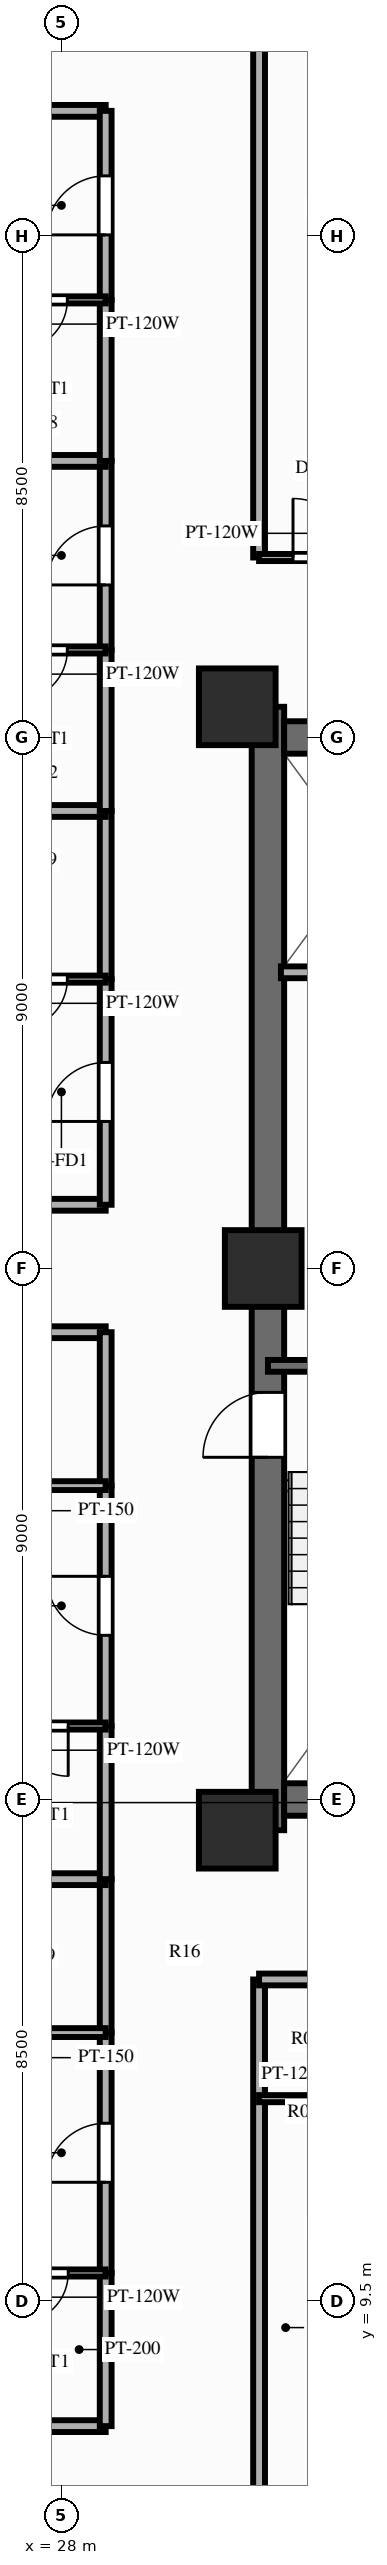
"""IFC4 building model, lengths in metres.
Left out: names, types, materials, properties, quantities, classifications, styles, units other than length and angle.
Written with IfcOpenShell. Run it as: python <this file> out.ifc"""

import sys

from ifc_helpers import new_model, si_unit, direction, frame, frame_2d, origin, origin_2d, place, context, subcontext, project, spatial, rectangle, extrude, source, transform, mapped, element, fill, save


model = new_model("IFC4")
c1 = context("Model", 3, precision=1e-05, world=origin(), true_north=direction((0.0, 1.0)))
c2 = subcontext(c1, "Body", "Model", "MODEL_VIEW")
j1 = project(units=[si_unit("LENGTHUNIT", "METRE"), si_unit("PLANEANGLEUNIT", "RADIAN")], contexts=[c1])
p1 = place(None, origin())
s1 = spatial("IfcSite", under=j1, at=p1, CompositionType="ELEMENT")
p2 = place(p1, origin())
s2 = spatial("IfcBuilding", under=s1, at=p2, CompositionType="ELEMENT")
p3 = place(p2, frame((0.0, 0.0, 116.85)))
s3 = spatial("IfcBuildingStorey", under=s2, at=p3, CompositionType="ELEMENT", Elevation=116.85)
p4 = place(p3, frame((31.5, 17.48, 0.0), z_axis=(0.0, 0.0, 1.0), x_axis=(0.0, 1.0, 0.0)))
e1 = element("IfcWall", 1, at=p4, inside=s3, PredefinedType="SHEAR", context=c2, shape_type="SweptSolid", body=[
    extrude(rectangle(XDim=19.04, YDim=0.55, at=frame_2d((9.52, 0.0))), origin(), (0.0, 0.0, 1.0), 3.0),
])
p5 = place(p4, frame((6.32, 0.0, 0.0)))
e2 = element("IfcOpeningElement", 2, at=p5, cuts=e1, PredefinedType="OPENING", context=c2, shape_type="SweptSolid", body=[
    extrude(rectangle(XDim=1.1, YDim=2.15, at=frame_2d((0.55, 1.075))), frame((0.0, 0.287, 0.0), z_axis=(0.0, -1.0, 0.0), x_axis=(1.0, 0.0, 0.0)), (0.0, 0.0, 1.0), 0.574),
])
p6 = place(p3, frame((31.775, 18.0, 0.0), z_axis=(0.0, 0.0, 1.0), x_axis=(1.0, 0.0, 0.0)))
e3 = element("IfcWall", 3, at=p6, inside=s3, PredefinedType="SHEAR", context=c2, shape_type="SweptSolid", body=[
    extrude(rectangle(XDim=12.45, YDim=0.55, at=frame_2d((6.225, 0.0))), origin(), (0.0, 0.0, 1.0), 3.0),
])
p7 = place(p3, frame((31.775, 36.0, 0.0), z_axis=(0.0, 0.0, 1.0), x_axis=(1.0, 0.0, 0.0)))
e4 = element("IfcWall", 4, at=p7, inside=s3, PredefinedType="SHEAR", context=c2, shape_type="SweptSolid", body=[
    extrude(rectangle(XDim=12.45, YDim=0.55, at=frame_2d((6.225, 0.0))), origin(), (0.0, 0.0, 1.0), 3.0),
])
p8 = place(p7, frame((5.175, 0.0, 0.0), z_axis=(0.0, 0.0, 1.0), x_axis=(-1.0, 0.0, 0.0)))
e5 = element("IfcOpeningElement", 5, at=p8, cuts=e4, PredefinedType="OPENING", context=c2, shape_type="SweptSolid", body=[
    extrude(rectangle(XDim=1.4, YDim=2.15, at=frame_2d((0.7, 1.075))), frame((0.0, 0.287, 0.0), z_axis=(0.0, -1.0, 0.0), x_axis=(1.0, 0.0, 0.0)), (0.0, 0.0, 1.0), 0.574),
])
m1 = source(origin(), c2, "Body", "SweptSolid", [
    extrude(rectangle(XDim=1.3, YDim=1.3, at=origin_2d()), origin(), (0.0, 0.0, 1.0), 3.0),
])
for number, where, z_axis, x_axis in (
    (6, (30.98, 17.48, 0.0), (0.0, 0.0, 1.0), (1.0, 0.0, 0.0)),
    (7, (30.98, 36.52, 0.0), (0.0, 0.0, 1.0), (1.0, 0.0, 0.0)),
    (8, (31.42, 27.0, 0.0), (0.0, 0.0, 1.0), (1.0, 0.0, 0.0)),
):
    element("IfcColumn", number, at=place(p3, frame(where, z_axis=z_axis, x_axis=x_axis)), inside=s3, PredefinedType="COLUMN", context=c2, shape_type="MappedRepresentation", body=[
        mapped(m1, transform((0.0, 0.0, 0.0), scale=1.0)),
    ])
p9 = place(p3, frame((31.5, 25.35, 0.0), z_axis=(0.0, 0.0, 1.0), x_axis=(1.0, 0.0, 0.0)))
e9 = element("IfcWall", 9, at=p9, inside=s3, PredefinedType="SOLIDWALL", context=c2, shape_type="SweptSolid", body=[
    extrude(rectangle(XDim=3.93, YDim=0.2, at=frame_2d((1.965, 0.0))), origin(), (0.0, 0.0, 1.0), 2.79),
])
p10 = place(p3, frame((31.72, 32.02, 0.0), z_axis=(0.0, 0.0, 1.0), x_axis=(1.0, 0.0, 0.0)))
e10 = element("IfcWall", 10, at=p10, inside=s3, PredefinedType="PARTITIONING", context=c2, shape_type="SweptSolid", body=[
    extrude(rectangle(XDim=2.8, YDim=0.2, at=frame_2d((1.4, 0.0))), origin(), (0.0, 0.0, 1.0), 2.79),
])
p11 = place(p3, frame((31.35, 14.95, 0.0), z_axis=(0.0, 0.0, 1.0), x_axis=(0.0, -1.0, 0.0)))
e11 = element("IfcWall", 11, at=p11, inside=s3, PredefinedType="PARTITIONING", context=c2, shape_type="SweptSolid", body=[
    extrude(rectangle(XDim=11.8, YDim=0.2, at=frame_2d((5.9, 0.0))), origin(), (0.0, 0.0, 1.0), 2.34),
])
p12 = place(p3, frame((31.35, 14.95, 0.0), z_axis=(0.0, 0.0, 1.0), x_axis=(1.0, 0.0, 0.0)))
e12 = element("IfcWall", 12, at=p12, inside=s3, PredefinedType="PARTITIONING", context=c2, shape_type="SweptSolid", body=[
    extrude(rectangle(XDim=3.458, YDim=0.2, at=frame_2d((1.729, 0.0))), origin(), (0.0, 0.0, 1.0), 2.79),
])
p13 = place(p3, frame((31.35, 12.93, 0.0), z_axis=(0.0, 0.0, 1.0), x_axis=(1.0, 0.0, 0.0)))
e13 = element("IfcWall", 13, at=p13, inside=s3, PredefinedType="PARTITIONING", context=c2, shape_type="SweptSolid", body=[
    extrude(rectangle(XDim=3.458, YDim=0.12, at=frame_2d((1.729, 0.0))), origin(), (0.0, 0.0, 1.0), 2.79),
])
p14 = place(p3, frame((31.35, 39.05, 0.0), z_axis=(0.0, 0.0, 1.0), x_axis=(0.0, 1.0, 0.0)))
e14 = element("IfcWall", 14, at=p14, inside=s3, PredefinedType="PARTITIONING", context=c2, shape_type="SweptSolid", body=[
    extrude(rectangle(XDim=11.8, YDim=0.2, at=frame_2d((5.9, 0.0))), origin(), (0.0, 0.0, 1.0), 2.34),
])
p15 = place(p3, frame((31.35, 39.05, 0.0), z_axis=(0.0, 0.0, 1.0), x_axis=(1.0, 0.0, 0.0)))
e15 = element("IfcWall", 15, at=p15, inside=s3, PredefinedType="PARTITIONING", context=c2, shape_type="SweptSolid", body=[
    extrude(rectangle(XDim=2.15, YDim=0.12, at=frame_2d((1.075, 0.0))), origin(), (0.0, 0.0, 1.0), 2.79),
])
p16 = place(p15, frame((0.575, 0.0, 0.0)))
e16 = element("IfcOpeningElement", 16, at=p16, cuts=e15, PredefinedType="OPENING", context=c2, shape_type="SweptSolid", body=[
    extrude(rectangle(XDim=1.0, YDim=2.1, at=frame_2d((0.5, 1.05))), frame((0.0, 0.072, 0.0), z_axis=(0.0, -1.0, 0.0), x_axis=(1.0, 0.0, 0.0)), (0.0, 0.0, 1.0), 0.144),
])
for number, where, z_axis, x_axis in (
    (17, (28.75, 7.38, 0.0), (0.0, 0.0, 1.0), (-1.0, 0.0, 0.0)),
    (18, (28.75, 25.92, 0.0), (0.0, 0.0, 1.0), (-1.0, 0.0, 0.0)),
):
    element("IfcWall", number, at=place(p3, frame(where, z_axis=z_axis, x_axis=x_axis)), inside=s3, PredefinedType="PARTITIONING", context=c2, shape_type="SweptSolid", body=[
        extrude(rectangle(XDim=16.6, YDim=0.2, at=frame_2d((8.3, 0.0))), origin(), (0.0, 0.0, 1.0), 2.79),
    ])
p17 = place(p3, frame((28.75, 7.38, 0.0), z_axis=(0.0, 0.0, 1.0), x_axis=(0.0, 1.0, 0.0)))
e19 = element("IfcWall", 19, at=p17, inside=s3, PredefinedType="PARTITIONING", context=c2, shape_type="SweptSolid", body=[
    extrude(rectangle(XDim=2.596, YDim=0.2, at=frame_2d((1.298, 0.0))), origin(), (0.0, 0.0, 1.0), 2.79),
])
p18 = place(p3, frame((28.75, 9.976, 0.0), z_axis=(0.0, 0.0, 1.0), x_axis=(0.0, 1.0, 0.0)))
e20 = element("IfcWall", 20, at=p18, inside=s3, PredefinedType="PARTITIONING", context=c2, shape_type="SweptSolid", body=[
    extrude(rectangle(XDim=4.074, YDim=0.2, at=frame_2d((2.037, 0.0))), origin(), (0.0, 0.0, 1.0), 2.79),
])
p19 = place(p18, frame((1.537, 0.0, 0.0)))
e21 = element("IfcOpeningElement", 21, at=p19, cuts=e20, PredefinedType="OPENING", context=c2, shape_type="SweptSolid", body=[
    extrude(rectangle(XDim=1.0, YDim=2.15, at=frame_2d((0.5, 1.075))), frame((0.0, 0.112, 0.0), z_axis=(0.0, -1.0, 0.0), x_axis=(1.0, 0.0, 0.0)), (0.0, 0.0, 1.0), 0.224),
])
p20 = place(p3, frame((28.75, 14.05, 0.0), z_axis=(0.0, 0.0, 1.0), x_axis=(0.0, 1.0, 0.0)))
e22 = element("IfcWall", 22, at=p20, inside=s3, PredefinedType="PARTITIONING", context=c2, shape_type="SweptSolid", body=[
    extrude(rectangle(XDim=2.6, YDim=0.2, at=frame_2d((1.3, 0.0))), origin(), (0.0, 0.0, 1.0), 2.79),
])
p21 = place(p3, frame((28.75, 9.976, 0.0), z_axis=(0.0, 0.0, 1.0), x_axis=(-1.0, 0.0, 0.0)))
e23 = element("IfcWall", 23, at=p21, inside=s3, PredefinedType="PARTITIONING", context=c2, shape_type="SweptSolid", body=[
    extrude(rectangle(XDim=2.12, YDim=0.12, at=frame_2d((1.06, 0.0))), origin(), (0.0, 0.0, 1.0), 2.79),
])
p22 = place(p21, frame((0.635, 0.0, 0.0)))
e24 = element("IfcOpeningElement", 24, at=p22, cuts=e23, PredefinedType="OPENING", context=c2, shape_type="SweptSolid", body=[
    extrude(rectangle(XDim=0.85, YDim=2.05, at=frame_2d((0.425, 1.025))), frame((0.0, 0.072, 0.0), z_axis=(0.0, -1.0, 0.0), x_axis=(1.0, 0.0, 0.0)), (0.0, 0.0, 1.0), 0.144),
])
p23 = place(p3, frame((28.75, 14.05, 0.0), z_axis=(0.0, 0.0, 1.0), x_axis=(-1.0, 0.0, 0.0)))
e25 = element("IfcWall", 25, at=p23, inside=s3, PredefinedType="PARTITIONING", context=c2, shape_type="SweptSolid", body=[
    extrude(rectangle(XDim=3.08, YDim=0.15, at=frame_2d((1.54, 0.0))), origin(), (0.0, 0.0, 1.0), 2.79),
])
p24 = place(p23, frame((1.09, 0.0, 0.0)))
e26 = element("IfcOpeningElement", 26, at=p24, cuts=e25, PredefinedType="OPENING", context=c2, shape_type="SweptSolid", body=[
    extrude(rectangle(XDim=0.9, YDim=2.1, at=frame_2d((0.45, 1.05))), frame((0.0, 0.087, 0.0), z_axis=(0.0, -1.0, 0.0), x_axis=(1.0, 0.0, 0.0)), (0.0, 0.0, 1.0), 0.174),
])
p25 = place(p3, frame((28.75, 16.65, 0.0), z_axis=(0.0, 0.0, 1.0), x_axis=(-1.0, 0.0, 0.0)))
e27 = element("IfcWall", 27, at=p25, inside=s3, PredefinedType="PARTITIONING", context=c2, shape_type="SweptSolid", body=[
    extrude(rectangle(XDim=16.6, YDim=0.2, at=frame_2d((8.3, 0.0))), origin(), (0.0, 0.0, 1.0), 2.79),
])
p26 = place(p3, frame((28.75, 16.65, 0.0), z_axis=(0.0, 0.0, 1.0), x_axis=(0.0, 1.0, 0.0)))
e28 = element("IfcWall", 28, at=p26, inside=s3, PredefinedType="PARTITIONING", context=c2, shape_type="SweptSolid", body=[
    extrude(rectangle(XDim=2.596, YDim=0.2, at=frame_2d((1.298, 0.0))), origin(), (0.0, 0.0, 1.0), 2.79),
])
p27 = place(p3, frame((28.75, 19.246, 0.0), z_axis=(0.0, 0.0, 1.0), x_axis=(0.0, 1.0, 0.0)))
e29 = element("IfcWall", 29, at=p27, inside=s3, PredefinedType="PARTITIONING", context=c2, shape_type="SweptSolid", body=[
    extrude(rectangle(XDim=4.074, YDim=0.2, at=frame_2d((2.037, 0.0))), origin(), (0.0, 0.0, 1.0), 2.79),
])
p28 = place(p27, frame((1.537, 0.0, 0.0)))
e30 = element("IfcOpeningElement", 30, at=p28, cuts=e29, PredefinedType="OPENING", context=c2, shape_type="SweptSolid", body=[
    extrude(rectangle(XDim=1.0, YDim=2.15, at=frame_2d((0.5, 1.075))), frame((0.0, 0.112, 0.0), z_axis=(0.0, -1.0, 0.0), x_axis=(1.0, 0.0, 0.0)), (0.0, 0.0, 1.0), 0.224),
])
p29 = place(p3, frame((28.75, 23.32, 0.0), z_axis=(0.0, 0.0, 1.0), x_axis=(0.0, 1.0, 0.0)))
e31 = element("IfcWall", 31, at=p29, inside=s3, PredefinedType="PARTITIONING", context=c2, shape_type="SweptSolid", body=[
    extrude(rectangle(XDim=2.6, YDim=0.2, at=frame_2d((1.3, 0.0))), origin(), (0.0, 0.0, 1.0), 2.79),
])
p30 = place(p3, frame((28.75, 19.246, 0.0), z_axis=(0.0, 0.0, 1.0), x_axis=(-1.0, 0.0, 0.0)))
e32 = element("IfcWall", 32, at=p30, inside=s3, PredefinedType="PARTITIONING", context=c2, shape_type="SweptSolid", body=[
    extrude(rectangle(XDim=2.12, YDim=0.12, at=frame_2d((1.06, 0.0))), origin(), (0.0, 0.0, 1.0), 2.79),
])
p31 = place(p30, frame((0.635, 0.0, 0.0)))
e33 = element("IfcOpeningElement", 33, at=p31, cuts=e32, PredefinedType="OPENING", context=c2, shape_type="SweptSolid", body=[
    extrude(rectangle(XDim=0.85, YDim=2.05, at=frame_2d((0.425, 1.025))), frame((0.0, 0.072, 0.0), z_axis=(0.0, -1.0, 0.0), x_axis=(1.0, 0.0, 0.0)), (0.0, 0.0, 1.0), 0.144),
])
p32 = place(p3, frame((28.75, 23.32, 0.0), z_axis=(0.0, 0.0, 1.0), x_axis=(-1.0, 0.0, 0.0)))
e34 = element("IfcWall", 34, at=p32, inside=s3, PredefinedType="PARTITIONING", context=c2, shape_type="SweptSolid", body=[
    extrude(rectangle(XDim=3.08, YDim=0.15, at=frame_2d((1.54, 0.0))), origin(), (0.0, 0.0, 1.0), 2.79),
])
p33 = place(p32, frame((1.09, 0.0, 0.0)))
e35 = element("IfcOpeningElement", 35, at=p33, cuts=e34, PredefinedType="OPENING", context=c2, shape_type="SweptSolid", body=[
    extrude(rectangle(XDim=0.9, YDim=2.1, at=frame_2d((0.45, 1.05))), frame((0.0, 0.087, 0.0), z_axis=(0.0, -1.0, 0.0), x_axis=(1.0, 0.0, 0.0)), (0.0, 0.0, 1.0), 0.174),
])
for number, where, z_axis, x_axis in (
    (36, (28.75, 28.08, 0.0), (0.0, 0.0, 1.0), (-1.0, 0.0, 0.0)),
    (37, (28.75, 46.62, 0.0), (0.0, 0.0, 1.0), (-1.0, 0.0, 0.0)),
):
    element("IfcWall", number, at=place(p3, frame(where, z_axis=z_axis, x_axis=x_axis)), inside=s3, PredefinedType="PARTITIONING", context=c2, shape_type="SweptSolid", body=[
        extrude(rectangle(XDim=16.6, YDim=0.2, at=frame_2d((8.3, 0.0))), origin(), (0.0, 0.0, 1.0), 2.79),
    ])
p34 = place(p3, frame((28.75, 28.08, 0.0), z_axis=(0.0, 0.0, 1.0), x_axis=(0.0, 1.0, 0.0)))
e38 = element("IfcWall", 38, at=p34, inside=s3, PredefinedType="PARTITIONING", context=c2, shape_type="SweptSolid", body=[
    extrude(rectangle(XDim=3.824, YDim=0.2, at=frame_2d((1.912, 0.0))), origin(), (0.0, 0.0, 1.0), 2.79),
])
p35 = place(p34, frame((1.412, 0.0, 0.0)))
e39 = element("IfcOpeningElement", 39, at=p35, cuts=e38, PredefinedType="OPENING", context=c2, shape_type="SweptSolid", body=[
    extrude(rectangle(XDim=1.0, YDim=2.15, at=frame_2d((0.5, 1.075))), frame((0.0, 0.112, 0.0), z_axis=(0.0, -1.0, 0.0), x_axis=(1.0, 0.0, 0.0)), (0.0, 0.0, 1.0), 0.224),
])
p36 = place(p3, frame((28.75, 31.904, 0.0), z_axis=(0.0, 0.0, 1.0), x_axis=(0.0, 1.0, 0.0)))
e40 = element("IfcWall", 40, at=p36, inside=s3, PredefinedType="PARTITIONING", context=c2, shape_type="SweptSolid", body=[
    extrude(rectangle(XDim=2.85, YDim=0.2, at=frame_2d((1.425, 0.0))), origin(), (0.0, 0.0, 1.0), 2.79),
])
p37 = place(p3, frame((28.75, 31.904, 0.0), z_axis=(0.0, 0.0, 1.0), x_axis=(-1.0, 0.0, 0.0)))
e41 = element("IfcWall", 41, at=p37, inside=s3, PredefinedType="PARTITIONING", context=c2, shape_type="SweptSolid", body=[
    extrude(rectangle(XDim=2.15, YDim=0.12, at=frame_2d((1.075, 0.0))), origin(), (0.0, 0.0, 1.0), 2.79),
])
p38 = place(p37, frame((0.65, 0.0, 0.0)))
e42 = element("IfcOpeningElement", 42, at=p38, cuts=e41, PredefinedType="OPENING", context=c2, shape_type="SweptSolid", body=[
    extrude(rectangle(XDim=0.85, YDim=2.05, at=frame_2d((0.425, 1.025))), frame((0.0, 0.072, 0.0), z_axis=(0.0, -1.0, 0.0), x_axis=(1.0, 0.0, 0.0)), (0.0, 0.0, 1.0), 0.144),
])
p39 = place(p3, frame((28.75, 34.754, 0.0), z_axis=(0.0, 0.0, 1.0), x_axis=(-1.0, 0.0, 0.0)))
e43 = element("IfcWall", 43, at=p39, inside=s3, PredefinedType="PARTITIONING", context=c2, shape_type="SweptSolid", body=[
    extrude(rectangle(XDim=16.6, YDim=0.2, at=frame_2d((8.3, 0.0))), origin(), (0.0, 0.0, 1.0), 2.79),
])
p40 = place(p3, frame((28.75, 34.754, 0.0), z_axis=(0.0, 0.0, 1.0), x_axis=(0.0, 1.0, 0.0)))
e44 = element("IfcWall", 44, at=p40, inside=s3, PredefinedType="PARTITIONING", context=c2, shape_type="SweptSolid", body=[
    extrude(rectangle(XDim=2.729, YDim=0.2, at=frame_2d((1.365, 0.0))), origin(), (0.0, 0.0, 1.0), 2.79),
])
p41 = place(p3, frame((28.75, 37.483, 0.0), z_axis=(0.0, 0.0, 1.0), x_axis=(0.0, 1.0, 0.0)))
e45 = element("IfcWall", 45, at=p41, inside=s3, PredefinedType="PARTITIONING", context=c2, shape_type="SweptSolid", body=[
    extrude(rectangle(XDim=3.204, YDim=0.2, at=frame_2d((1.602, 0.0))), origin(), (0.0, 0.0, 1.0), 2.79),
])
p42 = place(p41, frame((1.102, 0.0, 0.0)))
e46 = element("IfcOpeningElement", 46, at=p42, cuts=e45, PredefinedType="OPENING", context=c2, shape_type="SweptSolid", body=[
    extrude(rectangle(XDim=1.0, YDim=2.15, at=frame_2d((0.5, 1.075))), frame((0.0, 0.112, 0.0), z_axis=(0.0, -1.0, 0.0), x_axis=(1.0, 0.0, 0.0)), (0.0, 0.0, 1.0), 0.224),
])
p43 = place(p3, frame((28.75, 37.483, 0.0), z_axis=(0.0, 0.0, 1.0), x_axis=(-1.0, 0.0, 0.0)))
e47 = element("IfcWall", 47, at=p43, inside=s3, PredefinedType="PARTITIONING", context=c2, shape_type="SweptSolid", body=[
    extrude(rectangle(XDim=2.15, YDim=0.12, at=frame_2d((1.075, 0.0))), origin(), (0.0, 0.0, 1.0), 2.79),
])
p44 = place(p43, frame((0.65, 0.0, 0.0)))
e48 = element("IfcOpeningElement", 48, at=p44, cuts=e47, PredefinedType="OPENING", context=c2, shape_type="SweptSolid", body=[
    extrude(rectangle(XDim=0.85, YDim=2.05, at=frame_2d((0.425, 1.025))), frame((0.0, 0.072, 0.0), z_axis=(0.0, -1.0, 0.0), x_axis=(1.0, 0.0, 0.0)), (0.0, 0.0, 1.0), 0.144),
])
p45 = place(p3, frame((28.75, 40.687, 0.0), z_axis=(0.0, 0.0, 1.0), x_axis=(-1.0, 0.0, 0.0)))
e49 = element("IfcWall", 49, at=p45, inside=s3, PredefinedType="PARTITIONING", context=c2, shape_type="SweptSolid", body=[
    extrude(rectangle(XDim=16.6, YDim=0.2, at=frame_2d((8.3, 0.0))), origin(), (0.0, 0.0, 1.0), 2.79),
])
p46 = place(p3, frame((28.75, 40.687, 0.0), z_axis=(0.0, 0.0, 1.0), x_axis=(0.0, 1.0, 0.0)))
e50 = element("IfcWall", 50, at=p46, inside=s3, PredefinedType="PARTITIONING", context=c2, shape_type="SweptSolid", body=[
    extrude(rectangle(XDim=2.729, YDim=0.2, at=frame_2d((1.365, 0.0))), origin(), (0.0, 0.0, 1.0), 2.79),
])
p47 = place(p3, frame((28.75, 43.416, 0.0), z_axis=(0.0, 0.0, 1.0), x_axis=(0.0, 1.0, 0.0)))
e51 = element("IfcWall", 51, at=p47, inside=s3, PredefinedType="PARTITIONING", context=c2, shape_type="SweptSolid", body=[
    extrude(rectangle(XDim=3.204, YDim=0.2, at=frame_2d((1.602, 0.0))), origin(), (0.0, 0.0, 1.0), 2.79),
])
p48 = place(p47, frame((1.102, 0.0, 0.0)))
e52 = element("IfcOpeningElement", 52, at=p48, cuts=e51, PredefinedType="OPENING", context=c2, shape_type="SweptSolid", body=[
    extrude(rectangle(XDim=1.0, YDim=2.15, at=frame_2d((0.5, 1.075))), frame((0.0, 0.112, 0.0), z_axis=(0.0, -1.0, 0.0), x_axis=(1.0, 0.0, 0.0)), (0.0, 0.0, 1.0), 0.224),
])
p49 = place(p3, frame((28.75, 43.416, 0.0), z_axis=(0.0, 0.0, 1.0), x_axis=(-1.0, 0.0, 0.0)))
e53 = element("IfcWall", 53, at=p49, inside=s3, PredefinedType="PARTITIONING", context=c2, shape_type="SweptSolid", body=[
    extrude(rectangle(XDim=2.15, YDim=0.12, at=frame_2d((1.075, 0.0))), origin(), (0.0, 0.0, 1.0), 2.79),
])
p50 = place(p49, frame((0.65, 0.0, 0.0)))
e54 = element("IfcOpeningElement", 54, at=p50, cuts=e53, PredefinedType="OPENING", context=c2, shape_type="SweptSolid", body=[
    extrude(rectangle(XDim=0.85, YDim=2.05, at=frame_2d((0.425, 1.025))), frame((0.0, 0.072, 0.0), z_axis=(0.0, -1.0, 0.0), x_axis=(1.0, 0.0, 0.0)), (0.0, 0.0, 1.0), 0.144),
])
m2 = source(origin(), c2, "Body", "SweptSolid", [
    extrude(rectangle(XDim=1.1, YDim=2.15, at=frame_2d((0.55, 1.075))), frame((0.0, 0.025, 0.0), z_axis=(0.0, -1.0, 0.0), x_axis=(1.0, 0.0, 0.0)), (0.0, 0.0, 1.0), 0.05),
])
p51 = place(p5, origin())
e55 = element("IfcDoor", 55, at=p51, inside=s3, OperationType="SINGLE_SWING_LEFT", PredefinedType="DOOR", context=c2, shape_type="MappedRepresentation", body=[
    mapped(m2, transform((0.0, 0.0, 0.0), scale=1.0)),
])
fill(e2, e55)
m3 = source(origin(), c2, "Body", "SweptSolid", [
    extrude(rectangle(XDim=1.0, YDim=2.1, at=frame_2d((0.5, 1.05))), frame((0.0, 0.025, 0.0), z_axis=(0.0, -1.0, 0.0), x_axis=(1.0, 0.0, 0.0)), (0.0, 0.0, 1.0), 0.05),
])
p52 = place(p16, origin())
e56 = element("IfcDoor", 56, at=p52, inside=s3, OperationType="SINGLE_SWING_LEFT", PredefinedType="DOOR", context=c2, shape_type="MappedRepresentation", body=[
    mapped(m3, transform((0.0, 0.0, 0.0), scale=1.0)),
])
fill(e16, e56)
m4 = source(origin(), c2, "Body", "SweptSolid", [
    extrude(rectangle(XDim=1.0, YDim=2.15, at=frame_2d((0.5, 1.075))), frame((0.0, 0.025, 0.0), z_axis=(0.0, -1.0, 0.0), x_axis=(1.0, 0.0, 0.0)), (0.0, 0.0, 1.0), 0.05),
])
p53 = place(p19, origin())
e57 = element("IfcDoor", 57, at=p53, inside=s3, OperationType="SINGLE_SWING_LEFT", PredefinedType="DOOR", context=c2, shape_type="MappedRepresentation", body=[
    mapped(m4, transform((0.0, 0.0, 0.0), scale=1.0)),
])
fill(e21, e57)
m5 = source(origin(), c2, "Body", "SweptSolid", [
    extrude(rectangle(XDim=0.85, YDim=2.05, at=frame_2d((0.425, 1.025))), frame((0.0, 0.025, 0.0), z_axis=(0.0, -1.0, 0.0), x_axis=(1.0, 0.0, 0.0)), (0.0, 0.0, 1.0), 0.05),
])
p54 = place(p22, origin())
e58 = element("IfcDoor", 58, at=p54, inside=s3, OperationType="SINGLE_SWING_RIGHT", PredefinedType="DOOR", context=c2, shape_type="MappedRepresentation", body=[
    mapped(m5, transform((0.0, 0.0, 0.0), scale=1.0)),
])
fill(e24, e58)
p55 = place(p28, origin())
e59 = element("IfcDoor", 59, at=p55, inside=s3, OperationType="SINGLE_SWING_RIGHT", PredefinedType="DOOR", context=c2, shape_type="MappedRepresentation", body=[
    mapped(m4, transform((0.0, 0.0, 0.0), scale=1.0)),
])
fill(e30, e59)
p56 = place(p31, origin())
e60 = element("IfcDoor", 60, at=p56, inside=s3, OperationType="SINGLE_SWING_LEFT", PredefinedType="DOOR", context=c2, shape_type="MappedRepresentation", body=[
    mapped(m5, transform((0.0, 0.0, 0.0), scale=1.0)),
])
fill(e33, e60)
p57 = place(p35, origin())
e61 = element("IfcDoor", 61, at=p57, inside=s3, OperationType="SINGLE_SWING_LEFT", PredefinedType="DOOR", context=c2, shape_type="MappedRepresentation", body=[
    mapped(m4, transform((0.0, 0.0, 0.0), scale=1.0)),
])
fill(e39, e61)
p58 = place(p38, origin())
e62 = element("IfcDoor", 62, at=p58, inside=s3, OperationType="SINGLE_SWING_RIGHT", PredefinedType="DOOR", context=c2, shape_type="MappedRepresentation", body=[
    mapped(m5, transform((0.0, 0.0, 0.0), scale=1.0)),
])
fill(e42, e62)
p59 = place(p42, origin())
e63 = element("IfcDoor", 63, at=p59, inside=s3, OperationType="SINGLE_SWING_LEFT", PredefinedType="DOOR", context=c2, shape_type="MappedRepresentation", body=[
    mapped(m4, transform((0.0, 0.0, 0.0), scale=1.0)),
])
fill(e46, e63)
p60 = place(p44, origin())
e64 = element("IfcDoor", 64, at=p60, inside=s3, OperationType="SINGLE_SWING_RIGHT", PredefinedType="DOOR", context=c2, shape_type="MappedRepresentation", body=[
    mapped(m5, transform((0.0, 0.0, 0.0), scale=1.0)),
])
fill(e48, e64)
p61 = place(p48, origin())
e65 = element("IfcDoor", 65, at=p61, inside=s3, OperationType="SINGLE_SWING_LEFT", PredefinedType="DOOR", context=c2, shape_type="MappedRepresentation", body=[
    mapped(m4, transform((0.0, 0.0, 0.0), scale=1.0)),
])
fill(e52, e65)
p62 = place(p50, origin())
e66 = element("IfcDoor", 66, at=p62, inside=s3, OperationType="SINGLE_SWING_RIGHT", PredefinedType="DOOR", context=c2, shape_type="MappedRepresentation", body=[
    mapped(m5, transform((0.0, 0.0, 0.0), scale=1.0)),
])
fill(e54, e66)
save(model, sys.argv[1])
